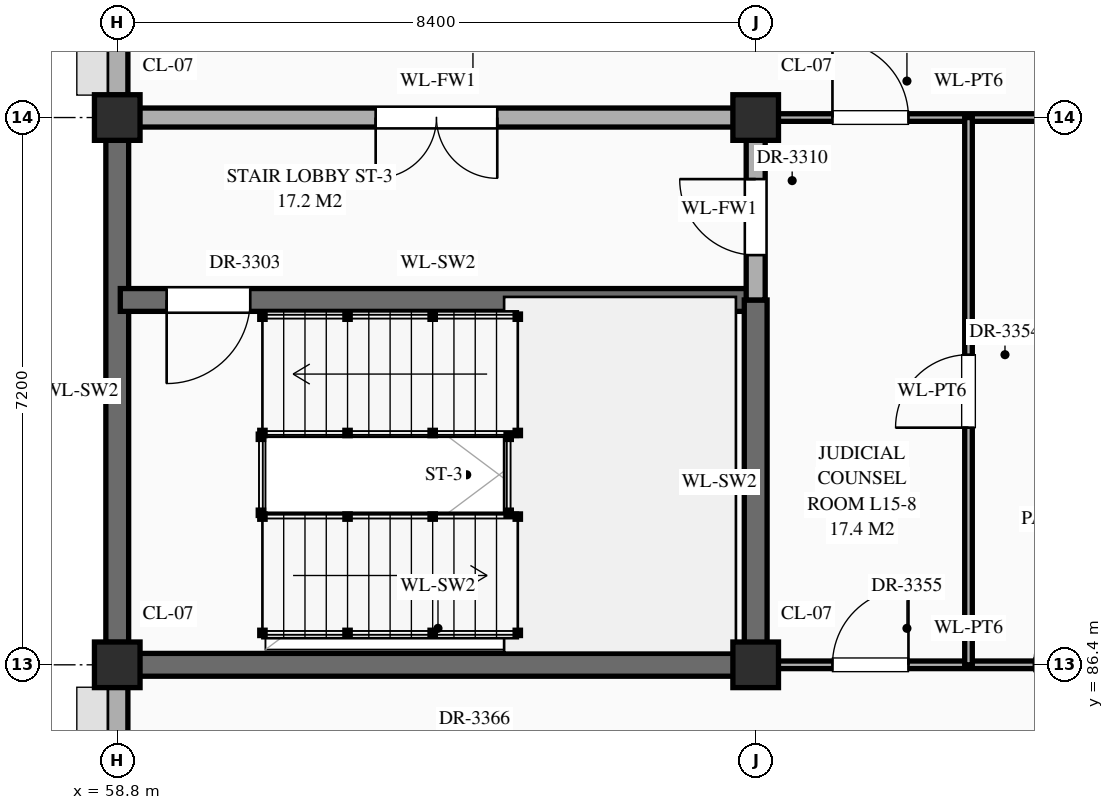
"""IFC4 building model, lengths in metres.
Left out: names, types, materials, properties, quantities, classifications, styles, units other than length and angle.
Written with IfcOpenShell. Run it as: python <this file> out.ifc"""

import sys

from ifc_helpers import new_model, si_unit, direction, frame, frame_2d, origin, origin_2d, place, context, subcontext, project, spatial, rectangle, extrude, element, fill, save


model = new_model("IFC4")
c1 = context("Model", 3, precision=1e-05, world=origin(), true_north=direction((0.0, 1.0)))
c2 = subcontext(c1, "Body", "Model", "MODEL_VIEW")
j1 = project(units=[si_unit("LENGTHUNIT", "METRE"), si_unit("PLANEANGLEUNIT", "RADIAN")], contexts=[c1])
p1 = place(None, origin())
s1 = spatial("IfcSite", under=j1, at=p1, CompositionType="ELEMENT")
p2 = place(p1, origin())
s2 = spatial("IfcBuilding", under=s1, at=p2, CompositionType="ELEMENT")
p3 = place(p2, frame((0.0, 0.0, 64.5)))
s3 = spatial("IfcBuildingStorey", under=s2, at=p3, CompositionType="ELEMENT", Elevation=64.5)
for number, where, z_axis, x_axis in (
    (1, (58.8, 86.4, 0.0), (0.0, 0.0, 1.0), (1.0, 0.0, 0.0)),
    (2, (58.8, 93.6, 0.0), (0.0, 0.0, 1.0), (1.0, 0.0, 0.0)),
    (3, (67.2, 86.4, 0.0), (0.0, 0.0, 1.0), (1.0, 0.0, 0.0)),
    (4, (67.2, 93.6, 0.0), (0.0, 0.0, 1.0), (1.0, 0.0, 0.0)),
):
    element("IfcColumn", number, at=place(p3, frame(where, z_axis=z_axis, x_axis=x_axis)), inside=s3, PredefinedType="COLUMN", context=c2, shape_type="SweptSolid", body=[
        extrude(rectangle(XDim=0.6, YDim=0.6, at=origin_2d()), origin(), (0.0, 0.0, 1.0), 4.2),
    ])
p4 = place(p3, frame((58.8, 79.495, 0.0), z_axis=(0.0, 0.0, 1.0), x_axis=(0.0, 1.0, 0.0)))
e5 = element("IfcWall", 5, at=p4, inside=s3, PredefinedType="STANDARD", context=c2, shape_type="SweptSolid", body=[
    extrude(rectangle(XDim=6.61, YDim=0.28, at=frame_2d((3.305, 0.0))), origin(), (0.0, 0.0, 1.0), 3.2),
])
p5 = place(p4, frame((1.33, 0.0, 0.85)))
e6 = element("IfcOpeningElement", 6, at=p5, cuts=e5, PredefinedType="OPENING", context=c2, shape_type="SweptSolid", body=[
    extrude(rectangle(XDim=1.55, YDim=1.38, at=frame_2d((0.775, 0.69))), frame((0.0, 0.152, 0.0), z_axis=(0.0, -1.0, 0.0), x_axis=(1.0, 0.0, 0.0)), (0.0, 0.0, 1.0), 0.304),
])
p6 = place(p3, frame((58.8, 86.695, 0.0), z_axis=(0.0, 0.0, 1.0), x_axis=(0.0, 1.0, 0.0)))
e7 = element("IfcWall", 7, at=p6, inside=s3, PredefinedType="SHEAR", context=c2, shape_type="SweptSolid", body=[
    extrude(rectangle(XDim=6.61, YDim=0.3, at=frame_2d((3.305, 0.0))), origin(), (0.0, 0.0, 1.0), 3.95),
])
p7 = place(p3, frame((58.8, 93.895, 0.0), z_axis=(0.0, 0.0, 1.0), x_axis=(0.0, 1.0, 0.0)))
e8 = element("IfcWall", 8, at=p7, inside=s3, PredefinedType="STANDARD", context=c2, shape_type="SweptSolid", body=[
    extrude(rectangle(XDim=6.61, YDim=0.28, at=frame_2d((3.305, 0.0))), origin(), (0.0, 0.0, 1.0), 3.3),
])
p8 = place(p7, frame((4.08, 0.0, 0.85)))
e9 = element("IfcOpeningElement", 9, at=p8, cuts=e8, PredefinedType="OPENING", context=c2, shape_type="SweptSolid", body=[
    extrude(rectangle(XDim=1.05, YDim=1.74, at=frame_2d((0.525, 0.87))), frame((0.0, 0.152, 0.0), z_axis=(0.0, -1.0, 0.0), x_axis=(1.0, 0.0, 0.0)), (0.0, 0.0, 1.0), 0.304),
])
p9 = place(p3, frame((58.84, 86.4, 0.0), z_axis=(0.0, 0.0, 1.0), x_axis=(1.0, 0.0, 0.0)))
e10 = element("IfcWall", 10, at=p9, inside=s3, PredefinedType="SHEAR", context=c2, shape_type="SweptSolid", body=[
    extrude(rectangle(XDim=8.36, YDim=0.3, at=frame_2d((4.18, 0.0))), origin(), (0.0, 0.0, 1.0), 3.85),
])
p10 = place(p3, frame((67.2, 86.4, 0.0), z_axis=(0.0, 0.0, 1.0), x_axis=(1.0, 0.0, 0.0)))
e11 = element("IfcWall", 11, at=p10, inside=s3, PredefinedType="STANDARD", context=c2, shape_type="SweptSolid", body=[
    extrude(rectangle(XDim=5.6, YDim=0.1, at=frame_2d((2.8, 0.0))), origin(), (0.0, 0.0, 1.0), 3.0),
])
p11 = place(p10, frame((1.01, 0.0, 0.0)))
e12 = element("IfcOpeningElement", 12, at=p11, cuts=e11, PredefinedType="OPENING", context=c2, shape_type="SweptSolid", body=[
    extrude(rectangle(XDim=1.0, YDim=2.25, at=frame_2d((0.5, 1.125))), frame((0.0, 0.062, 0.0), z_axis=(0.0, -1.0, 0.0), x_axis=(1.0, 0.0, 0.0)), (0.0, 0.0, 1.0), 0.124),
])
p12 = place(p10, frame((3.66, 0.0, 0.0)))
e13 = element("IfcOpeningElement", 13, at=p12, cuts=e11, PredefinedType="OPENING", context=c2, shape_type="SweptSolid", body=[
    extrude(rectangle(XDim=1.08, YDim=2.25, at=frame_2d((0.54, 1.125))), frame((0.0, 0.062, 0.0), z_axis=(0.0, -1.0, 0.0), x_axis=(1.0, 0.0, 0.0)), (0.0, 0.0, 1.0), 0.124),
])
p13 = place(p3, frame((58.84, 91.2, 0.0), z_axis=(0.0, 0.0, 1.0), x_axis=(1.0, 0.0, 0.0)))
e14 = element("IfcWall", 14, at=p13, inside=s3, PredefinedType="SHEAR", context=c2, shape_type="SweptSolid", body=[
    extrude(rectangle(XDim=8.36, YDim=0.3, at=frame_2d((4.18, 0.0))), origin(), (0.0, 0.0, 1.0), 3.95),
])
p14 = place(p13, frame((0.61, 0.0, 0.0)))
e15 = element("IfcOpeningElement", 15, at=p14, cuts=e14, PredefinedType="OPENING", context=c2, shape_type="SweptSolid", body=[
    extrude(rectangle(XDim=1.1, YDim=2.2, at=frame_2d((0.55, 1.1))), frame((0.0, 0.162, 0.0), z_axis=(0.0, -1.0, 0.0), x_axis=(1.0, 0.0, 0.0)), (0.0, 0.0, 1.0), 0.324),
])
p15 = place(p3, frame((58.84, 93.6, 0.0), z_axis=(0.0, 0.0, 1.0), x_axis=(1.0, 0.0, 0.0)))
e16 = element("IfcWall", 16, at=p15, inside=s3, PredefinedType="STANDARD", context=c2, shape_type="SweptSolid", body=[
    extrude(rectangle(XDim=8.36, YDim=0.25, at=frame_2d((4.18, 0.0))), origin(), (0.0, 0.0, 1.0), 3.1),
])
p16 = place(p15, frame((3.36, 0.0, 0.0)))
e17 = element("IfcOpeningElement", 17, at=p16, cuts=e16, PredefinedType="OPENING", context=c2, shape_type="SweptSolid", body=[
    extrude(rectangle(XDim=1.6, YDim=2.3, at=frame_2d((0.8, 1.15))), frame((0.0, 0.137, 0.0), z_axis=(0.0, -1.0, 0.0), x_axis=(1.0, 0.0, 0.0)), (0.0, 0.0, 1.0), 0.274),
])
p17 = place(p3, frame((67.2, 93.6, 0.0), z_axis=(0.0, 0.0, 1.0), x_axis=(1.0, 0.0, 0.0)))
e18 = element("IfcWall", 18, at=p17, inside=s3, PredefinedType="STANDARD", context=c2, shape_type="SweptSolid", body=[
    extrude(rectangle(XDim=5.6, YDim=0.1, at=frame_2d((2.8, 0.0))), origin(), (0.0, 0.0, 1.0), 3.1),
])
p18 = place(p17, frame((1.01, 0.0, 0.0)))
e19 = element("IfcOpeningElement", 19, at=p18, cuts=e18, PredefinedType="OPENING", context=c2, shape_type="SweptSolid", body=[
    extrude(rectangle(XDim=1.0, YDim=2.25, at=frame_2d((0.5, 1.125))), frame((0.0, 0.062, 0.0), z_axis=(0.0, -1.0, 0.0), x_axis=(1.0, 0.0, 0.0)), (0.0, 0.0, 1.0), 0.124),
])
p19 = place(p17, frame((3.68, 0.0, 0.0)))
e20 = element("IfcOpeningElement", 20, at=p19, cuts=e18, PredefinedType="OPENING", context=c2, shape_type="SweptSolid", body=[
    extrude(rectangle(XDim=1.04, YDim=2.2, at=frame_2d((0.52, 1.1))), frame((0.0, 0.062, 0.0), z_axis=(0.0, -1.0, 0.0), x_axis=(1.0, 0.0, 0.0)), (0.0, 0.0, 1.0), 0.124),
])
p20 = place(p3, frame((67.2, 86.4, 0.0), z_axis=(0.0, 0.0, 1.0), x_axis=(0.0, 1.0, 0.0)))
e21 = element("IfcWall", 21, at=p20, inside=s3, PredefinedType="SHEAR", context=c2, shape_type="SweptSolid", body=[
    extrude(rectangle(XDim=4.8, YDim=0.3, at=frame_2d((2.4, 0.0))), origin(), (0.0, 0.0, 1.0), 3.95),
])
p21 = place(p3, frame((67.2, 91.2, 0.0), z_axis=(0.0, 0.0, 1.0), x_axis=(0.0, 1.0, 0.0)))
e22 = element("IfcWall", 22, at=p21, inside=s3, PredefinedType="STANDARD", context=c2, shape_type="SweptSolid", body=[
    extrude(rectangle(XDim=2.4, YDim=0.25, at=frame_2d((1.2, 0.0))), origin(), (0.0, 0.0, 1.0), 3.2),
])
p22 = place(p21, frame((0.59, 0.0, 0.0)))
e23 = element("IfcOpeningElement", 23, at=p22, cuts=e22, PredefinedType="OPENING", context=c2, shape_type="SweptSolid", body=[
    extrude(rectangle(XDim=1.0, YDim=2.2, at=frame_2d((0.5, 1.1))), frame((0.0, 0.137, 0.0), z_axis=(0.0, -1.0, 0.0), x_axis=(1.0, 0.0, 0.0)), (0.0, 0.0, 1.0), 0.274),
])
p23 = place(p3, frame((70.0, 86.4, 0.0), z_axis=(0.0, 0.0, 1.0), x_axis=(0.0, 1.0, 0.0)))
e24 = element("IfcWall", 24, at=p23, inside=s3, PredefinedType="STANDARD", context=c2, shape_type="SweptSolid", body=[
    extrude(rectangle(XDim=7.2, YDim=0.1, at=frame_2d((3.6, 0.0))), origin(), (0.0, 0.0, 1.0), 3.95),
])
p24 = place(p23, frame((3.12, 0.0, 0.0)))
e25 = element("IfcOpeningElement", 25, at=p24, cuts=e24, PredefinedType="OPENING", context=c2, shape_type="SweptSolid", body=[
    extrude(rectangle(XDim=0.96, YDim=2.2, at=frame_2d((0.48, 1.1))), frame((0.0, 0.062, 0.0), z_axis=(0.0, -1.0, 0.0), x_axis=(1.0, 0.0, 0.0)), (0.0, 0.0, 1.0), 0.124),
])
p25 = place(p14, frame((1.1, 0.0, 0.0), z_axis=(0.0, 0.0, 1.0), x_axis=(-1.0, 0.0, 0.0)))
e26 = element("IfcDoor", 26, at=p25, inside=s3, OperationType="SINGLE_SWING_RIGHT", PredefinedType="DOOR", context=c2, shape_type="SweptSolid", body=[
    extrude(rectangle(XDim=1.1, YDim=2.2, at=frame_2d((0.55, 1.1))), frame((0.0, 0.025, 0.0), z_axis=(0.0, -1.0, 0.0), x_axis=(1.0, 0.0, 0.0)), (0.0, 0.0, 1.0), 0.05),
])
fill(e15, e26)
p26 = place(p16, frame((1.6, 0.0, 0.0), z_axis=(0.0, 0.0, 1.0), x_axis=(-1.0, 0.0, 0.0)))
e27 = element("IfcDoor", 27, at=p26, inside=s3, OperationType="DOUBLE_DOOR_SINGLE_SWING", PredefinedType="DOOR", context=c2, shape_type="SweptSolid", body=[
    extrude(rectangle(XDim=1.6, YDim=2.3, at=frame_2d((0.8, 1.15))), frame((0.0, 0.025, 0.0), z_axis=(0.0, -1.0, 0.0), x_axis=(1.0, 0.0, 0.0)), (0.0, 0.0, 1.0), 0.05),
])
fill(e17, e27)
p27 = place(p22, origin())
e28 = element("IfcDoor", 28, at=p27, inside=s3, OperationType="SINGLE_SWING_RIGHT", PredefinedType="DOOR", context=c2, shape_type="SweptSolid", body=[
    extrude(rectangle(XDim=1.0, YDim=2.2, at=frame_2d((0.5, 1.1))), frame((0.0, 0.025, 0.0), z_axis=(0.0, -1.0, 0.0), x_axis=(1.0, 0.0, 0.0)), (0.0, 0.0, 1.0), 0.05),
])
fill(e23, e28)
p28 = place(p18, origin())
e29 = element("IfcDoor", 29, at=p28, inside=s3, OperationType="SINGLE_SWING_LEFT", PredefinedType="DOOR", context=c2, shape_type="SweptSolid", body=[
    extrude(rectangle(XDim=1.0, YDim=2.25, at=frame_2d((0.5, 1.125))), frame((0.0, 0.025, 0.0), z_axis=(0.0, -1.0, 0.0), x_axis=(1.0, 0.0, 0.0)), (0.0, 0.0, 1.0), 0.05),
])
fill(e19, e29)
p29 = place(p24, origin())
e30 = element("IfcDoor", 30, at=p29, inside=s3, OperationType="SINGLE_SWING_LEFT", PredefinedType="DOOR", context=c2, shape_type="SweptSolid", body=[
    extrude(rectangle(XDim=0.96, YDim=2.2, at=frame_2d((0.48, 1.1))), frame((0.0, 0.025, 0.0), z_axis=(0.0, -1.0, 0.0), x_axis=(1.0, 0.0, 0.0)), (0.0, 0.0, 1.0), 0.05),
])
fill(e25, e30)
p30 = place(p11, origin())
e31 = element("IfcDoor", 31, at=p30, inside=s3, OperationType="SINGLE_SWING_RIGHT", PredefinedType="DOOR", context=c2, shape_type="SweptSolid", body=[
    extrude(rectangle(XDim=1.0, YDim=2.25, at=frame_2d((0.5, 1.125))), frame((0.0, 0.025, 0.0), z_axis=(0.0, -1.0, 0.0), x_axis=(1.0, 0.0, 0.0)), (0.0, 0.0, 1.0), 0.05),
])
fill(e12, e31)
p31 = place(p12, origin())
e32 = element("IfcDoor", 32, at=p31, inside=s3, OperationType="SINGLE_SWING_RIGHT", PredefinedType="DOOR", context=c2, shape_type="SweptSolid", body=[
    extrude(rectangle(XDim=1.08, YDim=2.25, at=frame_2d((0.54, 1.125))), frame((0.0, 0.025, 0.0), z_axis=(0.0, -1.0, 0.0), x_axis=(1.0, 0.0, 0.0)), (0.0, 0.0, 1.0), 0.05),
])
fill(e13, e32)
save(model, sys.argv[1])
